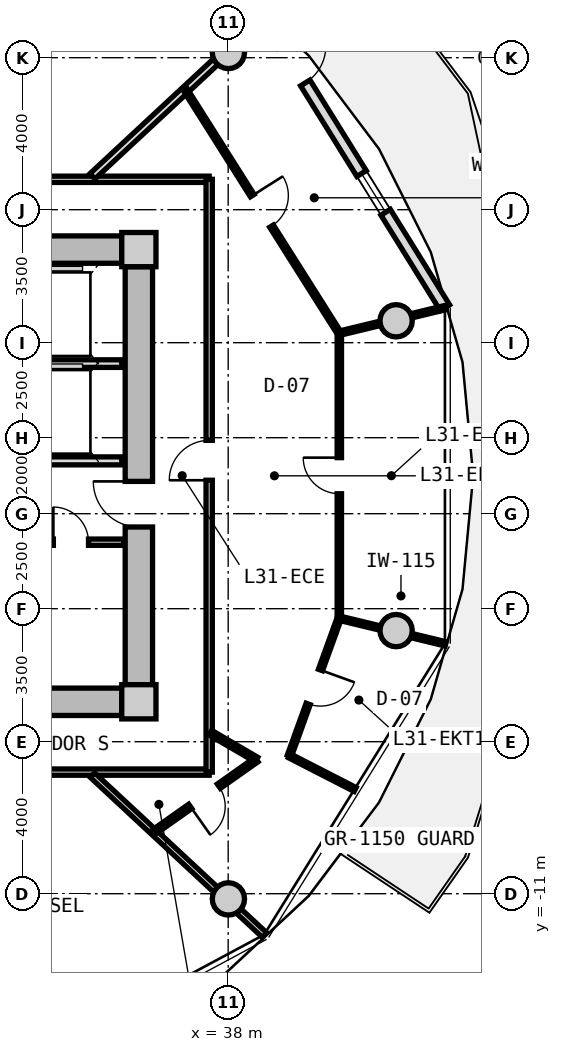
"""IFC4 building model, lengths in metres.
Left out: names, types, materials, properties, quantities, classifications, styles, units other than length and angle.
Written with IfcOpenShell. Run it as: python <this file> out.ifc"""

import sys

from ifc_helpers import new_model, si_unit, direction, frame, frame_2d, origin, origin_2d, place, context, subcontext, project, spatial, rectangle, circle, extrude, source, transform, mapped, element, fill, save


model = new_model("IFC4")
c1 = context("Model", 3, precision=1e-05, world=origin(), true_north=direction((0.0, 1.0)))
c2 = subcontext(c1, "Body", "Model", "MODEL_VIEW")
j1 = project(units=[si_unit("LENGTHUNIT", "METRE"), si_unit("PLANEANGLEUNIT", "RADIAN")], contexts=[c1])
p1 = place(None, origin())
s1 = spatial("IfcSite", under=j1, at=p1, CompositionType="ELEMENT")
p2 = place(p1, origin())
s2 = spatial("IfcBuilding", under=s1, at=p2, CompositionType="ELEMENT")
p3 = place(p2, frame((0.0, 0.0, 102.35)))
s3 = spatial("IfcBuildingStorey", under=s2, at=p3, CompositionType="ELEMENT", Elevation=102.35)
m1 = source(origin(), c2, "Body", "SweptSolid", [
    extrude(rectangle(XDim=0.9, YDim=0.9, at=origin_2d()), origin(), (0.0, 0.0, 1.0), 3.05),
])
for number, where, z_axis, x_axis in (
    (1, (35.65, -5.95, 0.0), (0.0, 0.0, 1.0), (1.0, 0.0, 0.0)),
    (2, (35.65, 5.95, 0.0), (0.0, 0.0, 1.0), (1.0, 0.0, 0.0)),
):
    element("IfcColumn", number, at=place(p3, frame(where, z_axis=z_axis, x_axis=x_axis)), inside=s3, PredefinedType="COLUMN", context=c2, shape_type="MappedRepresentation", body=[
        mapped(m1, transform((0.0, 0.0, 0.0), x_axis=(1.0, 0.0, 0.0), y_axis=(0.0, 1.0, 0.0), z_axis=(0.0, 0.0, 1.0), scale=1.0)),
    ])
m2 = source(origin(), c2, "Body", "SweptSolid", [
    extrude(rectangle(XDim=14.4, YDim=0.72, at=frame_2d((7.2, 0.0))), origin(), (0.0, 0.0, 1.0), 2.79),
])
for number, where, z_axis, x_axis in (
    (3, (20.8, 5.95, 0.0), (0.0, 0.0, 1.0), (1.0, 0.0, 0.0)),
    (4, (35.2, -5.95, 0.0), (0.0, 0.0, 1.0), (-1.0, 0.0, 0.0)),
):
    element("IfcWall", number, at=place(p3, frame(where, z_axis=z_axis, x_axis=x_axis)), inside=s3, PredefinedType="SHEAR", context=c2, shape_type="MappedRepresentation", body=[
        mapped(m2, transform((0.0, 0.0, 0.0), x_axis=(1.0, 0.0, 0.0), y_axis=(0.0, 1.0, 0.0), z_axis=(0.0, 0.0, 1.0), scale=1.0)),
    ])
m3 = source(origin(), c2, "Body", "SweptSolid", [
    extrude(rectangle(XDim=11.0, YDim=0.72, at=frame_2d((5.5, 0.0))), origin(), (0.0, 0.0, 1.0), 2.79),
])
p4 = place(p3, frame((35.65, 5.5, 0.0), z_axis=(0.0, 0.0, 1.0), x_axis=(0.0, -1.0, 0.0)))
e5 = element("IfcWall", 5, at=p4, inside=s3, PredefinedType="SHEAR", context=c2, shape_type="MappedRepresentation", body=[
    mapped(m3, transform((0.0, 0.0, 0.0), x_axis=(1.0, 0.0, 0.0), y_axis=(0.0, 1.0, 0.0), z_axis=(0.0, 0.0, 1.0), scale=1.0)),
])
p5 = place(p4, frame((5.65, 0.0, 0.0)))
e6 = element("IfcOpeningElement", 6, at=p5, cuts=e5, PredefinedType="OPENING", context=c2, shape_type="SweptSolid", body=[
    extrude(rectangle(XDim=1.2, YDim=2.15, at=frame_2d((0.6, 1.075))), frame((0.0, 0.37, 0.0), z_axis=(0.0, -1.0, 0.0), x_axis=(1.0, 0.0, 0.0)), (0.0, 0.0, 1.0), 0.74),
])
m4 = source(origin(), c2, "Body", "SweptSolid", [
    extrude(circle(Radius=0.425, at=origin_2d()), origin(), (0.0, 0.0, 1.0), 3.05),
])
for number, where, z_axis, x_axis in (
    (7, (42.419, 4.076, 0.0), (0.0, 0.0, 1.0), (1.0, 0.0, 0.0)),
    (8, (38.006, 11.137, 0.0), (0.0, 0.0, 1.0), (1.0, 0.0, 0.0)),
    (9, (38.006, -11.137, 0.0), (0.0, 0.0, 1.0), (1.0, 0.0, 0.0)),
    (10, (42.419, -4.076, 0.0), (0.0, 0.0, 1.0), (1.0, 0.0, 0.0)),
):
    element("IfcColumn", number, at=place(p3, frame(where, z_axis=z_axis, x_axis=x_axis)), inside=s3, PredefinedType="COLUMN", context=c2, shape_type="MappedRepresentation", body=[
        mapped(m4, transform((0.0, 0.0, 0.0), x_axis=(1.0, 0.0, 0.0), y_axis=(0.0, 1.0, 0.0), z_axis=(0.0, 0.0, 1.0), scale=1.0)),
    ])
m5 = source(origin(), c2, "Body", "SweptSolid", [
    extrude(rectangle(XDim=9.014, YDim=0.29, at=frame_2d((4.507, 0.0))), origin(), (0.0, 0.0, 1.0), 2.79),
])
p6 = place(p3, frame((38.947, 12.077, 0.0), z_axis=(0.0, 0.0, 1.0), x_axis=(0.527732945084, -0.849410347637, 0.0)))
e11 = element("IfcWall", 11, at=p6, inside=s3, PredefinedType="SOLIDWALL", context=c2, shape_type="MappedRepresentation", body=[
    mapped(m5, transform((0.0, 0.0, 0.0), x_axis=(1.0, 0.0, 0.0), y_axis=(0.0, 1.0, 0.0), z_axis=(0.0, 0.0, 1.0), scale=1.0)),
])
p7 = place(p6, frame((0.9, 0.0, 0.0)))
e12 = element("IfcOpeningElement", 12, at=p7, cuts=e11, PredefinedType="OPENING", context=c2, shape_type="SweptSolid", body=[
    extrude(rectangle(XDim=1.15, YDim=2.25, at=frame_2d((0.575, 1.125))), frame((0.0, 0.155, 0.0), z_axis=(0.0, -1.0, 0.0), x_axis=(1.0, 0.0, 0.0)), (0.0, 0.0, 1.0), 0.31),
])
p8 = place(p6, frame((4.857, 0.0, 0.85)))
e13 = element("IfcOpeningElement", 13, at=p8, cuts=e11, PredefinedType="OPENING", context=c2, shape_type="SweptSolid", body=[
    extrude(rectangle(XDim=1.2, YDim=1.5, at=frame_2d((0.6, 0.75))), frame((0.0, 0.155, 0.0), z_axis=(0.0, -1.0, 0.0), x_axis=(1.0, 0.0, 0.0)), (0.0, 0.0, 1.0), 0.31),
])
m6 = source(origin(), c2, "Body", "SweptSolid", [
    extrude(rectangle(XDim=3.2, YDim=0.2, at=frame_2d((1.6, 0.0))), origin(), (0.0, 0.0, 1.0), 2.775),
])
p9 = place(p3, frame((32.0, 2.95, 0.0), z_axis=(0.0, 0.0, 1.0), x_axis=(1.0, 0.0, 0.0)))
e14 = element("IfcWall", 14, at=p9, inside=s3, PredefinedType="PARTITIONING", context=c2, shape_type="MappedRepresentation", body=[
    mapped(m6, transform((0.0, 0.0, 0.0), x_axis=(1.0, 0.0, 0.0), y_axis=(0.0, 1.0, 0.0), z_axis=(0.0, 0.0, 1.0), scale=1.0)),
])
m7 = source(origin(), c2, "Body", "SweptSolid", [
    extrude(rectangle(XDim=6.66, YDim=0.21, at=frame_2d((3.33, 0.0))), origin(), (0.0, 0.0, 1.0), 2.775),
])
p10 = place(p3, frame((28.54, 0.39, 0.0), z_axis=(0.0, 0.0, 1.0), x_axis=(1.0, 0.0, 0.0)))
e15 = element("IfcWall", 15, at=p10, inside=s3, PredefinedType="PARTITIONING", context=c2, shape_type="MappedRepresentation", body=[
    mapped(m7, transform((0.0, 0.0, 0.0), x_axis=(1.0, 0.0, 0.0), y_axis=(0.0, 1.0, 0.0), z_axis=(0.0, 0.0, 1.0), scale=1.0)),
])
p11 = place(p10, frame((1.0, 0.0, 0.0)))
e16 = element("IfcOpeningElement", 16, at=p11, cuts=e15, PredefinedType="OPENING", context=c2, shape_type="SweptSolid", body=[
    extrude(rectangle(XDim=1.2, YDim=2.15, at=frame_2d((0.6, 1.075))), frame((0.0, 0.115, 0.0), z_axis=(0.0, -1.0, 0.0), x_axis=(1.0, 0.0, 0.0)), (0.0, 0.0, 1.0), 0.23),
])
m8 = source(origin(), c2, "Body", "SweptSolid", [
    extrude(rectangle(XDim=2.7, YDim=0.165, at=frame_2d((1.35, 0.0))), origin(), (0.0, 0.0, 1.0), 2.775),
])
p12 = place(p3, frame((32.55, -1.75, 0.0), z_axis=(0.0, 0.0, 1.0), x_axis=(1.0, 0.0, 0.0)))
e17 = element("IfcWall", 17, at=p12, inside=s3, PredefinedType="PARTITIONING", context=c2, shape_type="MappedRepresentation", body=[
    mapped(m8, transform((0.0, 0.0, 0.0), x_axis=(1.0, 0.0, 0.0), y_axis=(0.0, 1.0, 0.0), z_axis=(0.0, 0.0, 1.0), scale=1.0)),
])
p13 = place(p12, frame((0.85, 0.0, 0.0)))
e18 = element("IfcOpeningElement", 18, at=p13, cuts=e17, PredefinedType="OPENING", context=c2, shape_type="SweptSolid", body=[
    extrude(rectangle(XDim=0.925, YDim=2.1, at=frame_2d((0.462, 1.05))), frame((0.0, 0.093, 0.0), z_axis=(0.0, -1.0, 0.0), x_axis=(1.0, 0.0, 0.0)), (0.0, 0.0, 1.0), 0.185),
])
m9 = source(origin(), c2, "Body", "SweptSolid", [
    extrude(rectangle(XDim=9.234, YDim=0.165, at=frame_2d((4.617, 0.0))), origin(), (0.0, 0.0, 1.0), 2.775),
])
p14 = place(p3, frame((28.266, 7.8, 0.0), z_axis=(0.0, 0.0, 1.0), x_axis=(1.0, 0.0, 0.0)))
e19 = element("IfcWall", 19, at=p14, inside=s3, PredefinedType="PARTITIONING", context=c2, shape_type="MappedRepresentation", body=[
    mapped(m9, transform((0.0, 0.0, 0.0), x_axis=(1.0, 0.0, 0.0), y_axis=(0.0, 1.0, 0.0), z_axis=(0.0, 0.0, 1.0), scale=1.0)),
])
p15 = place(p14, frame((2.588, 0.0, 0.0)))
e20 = element("IfcOpeningElement", 20, at=p15, cuts=e19, PredefinedType="OPENING", context=c2, shape_type="SweptSolid", body=[
    extrude(rectangle(XDim=1.25, YDim=2.2, at=frame_2d((0.625, 1.1))), frame((0.0, 0.093, 0.0), z_axis=(0.0, -1.0, 0.0), x_axis=(1.0, 0.0, 0.0)), (0.0, 0.0, 1.0), 0.185),
])
m10 = source(origin(), c2, "Body", "SweptSolid", [
    extrude(rectangle(XDim=8.6, YDim=0.165, at=frame_2d((4.3, 0.0))), origin(), (0.0, 0.0, 1.0), 2.775),
])
p16 = place(p3, frame((37.5, -7.8, 0.0), z_axis=(0.0, 0.0, 1.0), x_axis=(-1.0, 0.0, 0.0)))
e21 = element("IfcWall", 21, at=p16, inside=s3, PredefinedType="PARTITIONING", context=c2, shape_type="MappedRepresentation", body=[
    mapped(m10, transform((0.0, 0.0, 0.0), x_axis=(1.0, 0.0, 0.0), y_axis=(0.0, 1.0, 0.0), z_axis=(0.0, 0.0, 1.0), scale=1.0)),
])
m11 = source(origin(), c2, "Body", "SweptSolid", [
    extrude(rectangle(XDim=15.6, YDim=0.165, at=frame_2d((7.8, 0.0))), origin(), (0.0, 0.0, 1.0), 2.775),
])
p17 = place(p3, frame((37.5, 7.8, 0.0), z_axis=(0.0, 0.0, 1.0), x_axis=(0.0, -1.0, 0.0)))
e22 = element("IfcWall", 22, at=p17, inside=s3, PredefinedType="PARTITIONING", context=c2, shape_type="MappedRepresentation", body=[
    mapped(m11, transform((0.0, 0.0, 0.0), x_axis=(1.0, 0.0, 0.0), y_axis=(0.0, 1.0, 0.0), z_axis=(0.0, 0.0, 1.0), scale=1.0)),
])
p18 = place(p17, frame((6.87, 0.0, 0.0)))
e23 = element("IfcOpeningElement", 23, at=p18, cuts=e22, PredefinedType="OPENING", context=c2, shape_type="SweptSolid", body=[
    extrude(rectangle(XDim=1.05, YDim=2.15, at=frame_2d((0.525, 1.075))), frame((0.0, 0.093, 0.0), z_axis=(0.0, -1.0, 0.0), x_axis=(1.0, 0.0, 0.0)), (0.0, 0.0, 1.0), 0.185),
])
m12 = source(origin(), c2, "Body", "SweptSolid", [
    extrude(rectangle(XDim=6.187, YDim=0.165, at=frame_2d((3.093, 0.0))), origin(), (0.0, 0.0, 1.0), 2.275),
])
p19 = place(p3, frame((34.429, -7.88, 0.0), z_axis=(0.0, 0.0, 1.0), x_axis=(0.732501077882, -0.680765870841, 0.0)))
e24 = element("IfcWall", 24, at=p19, inside=s3, PredefinedType="PARTITIONING", context=c2, shape_type="MappedRepresentation", body=[
    mapped(m12, transform((0.0, 0.0, 0.0), x_axis=(1.0, 0.0, 0.0), y_axis=(0.0, 1.0, 0.0), z_axis=(0.0, 0.0, 1.0), scale=1.0)),
])
m13 = source(origin(), c2, "Body", "SweptSolid", [
    extrude(rectangle(XDim=6.187, YDim=0.19, at=frame_2d((3.093, 0.0))), origin(), (0.0, 0.0, 1.0), 2.275),
])
p20 = place(p3, frame((34.429, 7.88, 0.0), z_axis=(0.0, 0.0, 1.0), x_axis=(0.732501077882, 0.680765870841, 0.0)))
e25 = element("IfcWall", 25, at=p20, inside=s3, PredefinedType="PARTITIONING", context=c2, shape_type="MappedRepresentation", body=[
    mapped(m13, transform((0.0, 0.0, 0.0), x_axis=(1.0, 0.0, 0.0), y_axis=(0.0, 1.0, 0.0), z_axis=(0.0, 0.0, 1.0), scale=1.0)),
])
m14 = source(origin(), c2, "Body", "SweptSolid", [
    extrude(rectangle(XDim=7.499, YDim=0.115, at=frame_2d((3.75, 0.0))), origin(), (0.0, 0.0, 1.0), 2.775),
])
p21 = place(p3, frame((40.925, -3.75, 0.0), z_axis=(0.0, 0.0, 1.0), x_axis=(0.0, 1.0, 0.0)))
e26 = element("IfcWall", 26, at=p21, inside=s3, PredefinedType="PARTITIONING", context=c2, shape_type="MappedRepresentation", body=[
    mapped(m14, transform((0.0, 0.0, 0.0), x_axis=(1.0, 0.0, 0.0), y_axis=(0.0, 1.0, 0.0), z_axis=(0.0, 0.0, 1.0), scale=1.0)),
])
p22 = place(p21, frame((3.275, 0.0, 0.0)))
e27 = element("IfcOpeningElement", 27, at=p22, cuts=e26, PredefinedType="OPENING", context=c2, shape_type="SweptSolid", body=[
    extrude(rectangle(XDim=0.95, YDim=2.1, at=frame_2d((0.475, 1.05))), frame((0.0, 0.067, 0.0), z_axis=(0.0, -1.0, 0.0), x_axis=(1.0, 0.0, 0.0)), (0.0, 0.0, 1.0), 0.135),
])
m15 = source(origin(), c2, "Body", "SweptSolid", [
    extrude(rectangle(XDim=2.879, YDim=0.115, at=frame_2d((1.439, 0.0))), origin(), (0.0, 0.0, 1.0), 2.275),
])
p23 = place(p3, frame((40.925, -3.75, 0.0), z_axis=(0.0, 0.0, 1.0), x_axis=(0.972018140943, -0.234905797454, 0.0)))
e28 = element("IfcWall", 28, at=p23, inside=s3, PredefinedType="PARTITIONING", context=c2, shape_type="MappedRepresentation", body=[
    mapped(m15, transform((0.0, 0.0, 0.0), x_axis=(1.0, 0.0, 0.0), y_axis=(0.0, 1.0, 0.0), z_axis=(0.0, 0.0, 1.0), scale=1.0)),
])
m16 = source(origin(), c2, "Body", "SweptSolid", [
    extrude(rectangle(XDim=7.618, YDim=0.115, at=frame_2d((3.809, 0.0))), origin(), (0.0, 0.0, 1.0), 2.775),
])
p24 = place(p3, frame((40.923, 3.749, 0.0), z_axis=(0.0, 0.0, 1.0), x_axis=(-0.534316104929, 0.845284744931, 0.0)))
e29 = element("IfcWall", 29, at=p24, inside=s3, PredefinedType="PARTITIONING", context=c2, shape_type="MappedRepresentation", body=[
    mapped(m16, transform((0.0, 0.0, 0.0), x_axis=(1.0, 0.0, 0.0), y_axis=(0.0, 1.0, 0.0), z_axis=(0.0, 0.0, 1.0), scale=1.0)),
])
p25 = place(p24, frame((3.334, 0.0, 0.0)))
e30 = element("IfcOpeningElement", 30, at=p25, cuts=e29, PredefinedType="OPENING", context=c2, shape_type="SweptSolid", body=[
    extrude(rectangle(XDim=0.95, YDim=2.1, at=frame_2d((0.475, 1.05))), frame((0.0, 0.067, 0.0), z_axis=(0.0, -1.0, 0.0), x_axis=(1.0, 0.0, 0.0)), (0.0, 0.0, 1.0), 0.135),
])
m17 = source(origin(), c2, "Body", "SweptSolid", [
    extrude(rectangle(XDim=2.881, YDim=0.115, at=frame_2d((1.44, 0.0))), origin(), (0.0, 0.0, 1.0), 2.275),
])
p26 = place(p3, frame((40.923, 3.749, 0.0), z_axis=(0.0, 0.0, 1.0), x_axis=(0.972031524605, 0.234850410208, 0.0)))
e31 = element("IfcWall", 31, at=p26, inside=s3, PredefinedType="PARTITIONING", context=c2, shape_type="MappedRepresentation", body=[
    mapped(m17, transform((0.0, 0.0, 0.0), x_axis=(1.0, 0.0, 0.0), y_axis=(0.0, 1.0, 0.0), z_axis=(0.0, 0.0, 1.0), scale=1.0)),
])
m18 = source(origin(), c2, "Body", "SweptSolid", [
    extrude(rectangle(XDim=1.407, YDim=0.14, at=frame_2d((0.704, 0.0))), origin(), (0.0, 0.0, 1.0), 2.775),
])
p27 = place(p3, frame((37.53, -6.762, 0.0), z_axis=(0.0, 0.0, 1.0), x_axis=(0.863539718977, -0.504280828258, 0.0)))
e32 = element("IfcWall", 32, at=p27, inside=s3, PredefinedType="PARTITIONING", context=c2, shape_type="MappedRepresentation", body=[
    mapped(m18, transform((0.0, 0.0, 0.0), x_axis=(1.0, 0.0, 0.0), y_axis=(0.0, 1.0, 0.0), z_axis=(0.0, 0.0, 1.0), scale=1.0)),
])
m19 = source(origin(), c2, "Body", "SweptSolid", [
    extrude(rectangle(XDim=3.347, YDim=0.14, at=frame_2d((1.673, 0.0))), origin(), (0.0, 0.0, 1.0), 2.775),
])
p28 = place(p3, frame((38.745, -7.472, 0.0), z_axis=(0.0, 0.0, 1.0), x_axis=(-0.81705680263, -0.576557179537, 0.0)))
e33 = element("IfcWall", 33, at=p28, inside=s3, PredefinedType="PARTITIONING", context=c2, shape_type="MappedRepresentation", body=[
    mapped(m19, transform((0.0, 0.0, 0.0), x_axis=(1.0, 0.0, 0.0), y_axis=(0.0, 1.0, 0.0), z_axis=(0.0, 0.0, 1.0), scale=1.0)),
])
p29 = place(p28, frame((1.214, 0.0, 0.0)))
e34 = element("IfcOpeningElement", 34, at=p29, cuts=e33, PredefinedType="OPENING", context=c2, shape_type="SweptSolid", body=[
    extrude(rectangle(XDim=0.92, YDim=2.1, at=frame_2d((0.46, 1.05))), frame((0.0, 0.08, 0.0), z_axis=(0.0, -1.0, 0.0), x_axis=(1.0, 0.0, 0.0)), (0.0, 0.0, 1.0), 0.16),
])
m20 = source(origin(), c2, "Body", "SweptSolid", [
    extrude(rectangle(XDim=1.945, YDim=0.115, at=frame_2d((0.973, 0.0))), origin(), (0.0, 0.0, 1.0), 2.775),
])
p30 = place(p3, frame((39.611, -7.37, 0.0), z_axis=(0.0, 0.0, 1.0), x_axis=(0.889684148329, -0.456576517368, 0.0)))
e35 = element("IfcWall", 35, at=p30, inside=s3, PredefinedType="PARTITIONING", context=c2, shape_type="MappedRepresentation", body=[
    mapped(m20, transform((0.0, 0.0, 0.0), x_axis=(1.0, 0.0, 0.0), y_axis=(0.0, 1.0, 0.0), z_axis=(0.0, 0.0, 1.0), scale=1.0)),
])
m21 = source(origin(), c2, "Body", "SweptSolid", [
    extrude(rectangle(XDim=3.852, YDim=0.115, at=frame_2d((1.926, 0.0))), origin(), (0.0, 0.0, 1.0), 2.775),
])
p31 = place(p3, frame((39.611, -7.37, 0.0), z_axis=(0.0, 0.0, 1.0), x_axis=(0.340653649518, 0.940188859257, 0.0)))
e36 = element("IfcWall", 36, at=p31, inside=s3, PredefinedType="PARTITIONING", context=c2, shape_type="MappedRepresentation", body=[
    mapped(m21, transform((0.0, 0.0, 0.0), x_axis=(1.0, 0.0, 0.0), y_axis=(0.0, 1.0, 0.0), z_axis=(0.0, 0.0, 1.0), scale=1.0)),
])
p32 = place(p31, frame((1.451, 0.0, 0.0)))
e37 = element("IfcOpeningElement", 37, at=p32, cuts=e36, PredefinedType="OPENING", context=c2, shape_type="SweptSolid", body=[
    extrude(rectangle(XDim=0.95, YDim=2.1, at=frame_2d((0.475, 1.05))), frame((0.0, 0.067, 0.0), z_axis=(0.0, -1.0, 0.0), x_axis=(1.0, 0.0, 0.0)), (0.0, 0.0, 1.0), 0.135),
])
m22 = source(origin(), c2, "Body", "SweptSolid", [
    extrude(rectangle(XDim=1.15, YDim=2.25, at=frame_2d((0.575, 1.125))), frame((0.0, 0.025, 0.0), z_axis=(0.0, -1.0, 0.0), x_axis=(1.0, 0.0, 0.0)), (0.0, 0.0, 1.0), 0.05),
])
p33 = place(p7, origin())
e38 = element("IfcDoor", 38, at=p33, inside=s3, OperationType="SINGLE_SWING_LEFT", PredefinedType="DOOR", context=c2, shape_type="MappedRepresentation", body=[
    mapped(m22, transform((0.0, 0.0, 0.0), x_axis=(1.0, 0.0, 0.0), y_axis=(0.0, 1.0, 0.0), z_axis=(0.0, 0.0, 1.0), scale=1.0)),
])
fill(e12, e38)
m23 = source(origin(), c2, "Body", "SweptSolid", [
    extrude(rectangle(XDim=1.2, YDim=1.5, at=frame_2d((0.6, 0.75))), frame((0.0, 0.03, 0.0), z_axis=(0.0, -1.0, 0.0), x_axis=(1.0, 0.0, 0.0)), (0.0, 0.0, 1.0), 0.06),
])
p34 = place(p8, origin())
e39 = element("IfcWindow", 39, at=p34, inside=s3, PartitioningType="SINGLE_PANEL", PredefinedType="WINDOW", context=c2, shape_type="MappedRepresentation", body=[
    mapped(m23, transform((0.0, 0.0, 0.0), x_axis=(1.0, 0.0, 0.0), y_axis=(0.0, 1.0, 0.0), z_axis=(0.0, 0.0, 1.0), scale=1.0)),
])
fill(e13, e39)
m24 = source(origin(), c2, "Body", "SweptSolid", [
    extrude(rectangle(XDim=1.2, YDim=2.15, at=frame_2d((0.6, 1.075))), frame((0.0, 0.025, 0.0), z_axis=(0.0, -1.0, 0.0), x_axis=(1.0, 0.0, 0.0)), (0.0, 0.0, 1.0), 0.05),
])
p35 = place(p5, frame((1.2, 0.0, 0.0), z_axis=(0.0, 0.0, 1.0), x_axis=(-1.0, 0.0, 0.0)))
e40 = element("IfcDoor", 40, at=p35, inside=s3, OperationType="SINGLE_SWING_RIGHT", PredefinedType="DOOR", context=c2, shape_type="MappedRepresentation", body=[
    mapped(m24, transform((0.0, 0.0, 0.0), x_axis=(1.0, 0.0, 0.0), y_axis=(0.0, 1.0, 0.0), z_axis=(0.0, 0.0, 1.0), scale=1.0)),
])
fill(e6, e40)
m25 = source(origin(), c2, "Body", "SweptSolid", [
    extrude(rectangle(XDim=0.925, YDim=2.1, at=frame_2d((0.462, 1.05))), frame((0.0, 0.025, 0.0), z_axis=(0.0, -1.0, 0.0), x_axis=(1.0, 0.0, 0.0)), (0.0, 0.0, 1.0), 0.05),
])
p36 = place(p13, origin())
e41 = element("IfcDoor", 41, at=p36, inside=s3, OperationType="SINGLE_SWING_LEFT", PredefinedType="DOOR", context=c2, shape_type="MappedRepresentation", body=[
    mapped(m25, transform((0.0, 0.0, 0.0), x_axis=(1.0, 0.0, 0.0), y_axis=(0.0, 1.0, 0.0), z_axis=(0.0, 0.0, 1.0), scale=1.0)),
])
fill(e18, e41)
m26 = source(origin(), c2, "Body", "SweptSolid", [
    extrude(rectangle(XDim=1.05, YDim=2.15, at=frame_2d((0.525, 1.075))), frame((0.0, 0.025, 0.0), z_axis=(0.0, -1.0, 0.0), x_axis=(1.0, 0.0, 0.0)), (0.0, 0.0, 1.0), 0.05),
])
p37 = place(p18, frame((1.05, 0.0, 0.0), z_axis=(0.0, 0.0, 1.0), x_axis=(-1.0, 0.0, 0.0)))
e42 = element("IfcDoor", 42, at=p37, inside=s3, OperationType="SINGLE_SWING_LEFT", PredefinedType="DOOR", context=c2, shape_type="MappedRepresentation", body=[
    mapped(m26, transform((0.0, 0.0, 0.0), x_axis=(1.0, 0.0, 0.0), y_axis=(0.0, 1.0, 0.0), z_axis=(0.0, 0.0, 1.0), scale=1.0)),
])
fill(e23, e42)
m27 = source(origin(), c2, "Body", "SweptSolid", [
    extrude(rectangle(XDim=0.92, YDim=2.1, at=frame_2d((0.46, 1.05))), frame((0.0, 0.025, 0.0), z_axis=(0.0, -1.0, 0.0), x_axis=(1.0, 0.0, 0.0)), (0.0, 0.0, 1.0), 0.05),
])
p38 = place(p29, origin())
e43 = element("IfcDoor", 43, at=p38, inside=s3, OperationType="SINGLE_SWING_RIGHT", PredefinedType="DOOR", context=c2, shape_type="MappedRepresentation", body=[
    mapped(m27, transform((0.0, 0.0, 0.0), x_axis=(1.0, 0.0, 0.0), y_axis=(0.0, 1.0, 0.0), z_axis=(0.0, 0.0, 1.0), scale=1.0)),
])
fill(e34, e43)
m28 = source(origin(), c2, "Body", "SweptSolid", [
    extrude(rectangle(XDim=0.95, YDim=2.1, at=frame_2d((0.475, 1.05))), frame((0.0, 0.025, 0.0), z_axis=(0.0, -1.0, 0.0), x_axis=(1.0, 0.0, 0.0)), (0.0, 0.0, 1.0), 0.05),
])
p39 = place(p32, frame((0.95, 0.0, 0.0), z_axis=(0.0, 0.0, 1.0), x_axis=(-1.0, 0.0, 0.0)))
e44 = element("IfcDoor", 44, at=p39, inside=s3, OperationType="SINGLE_SWING_LEFT", PredefinedType="DOOR", context=c2, shape_type="MappedRepresentation", body=[
    mapped(m28, transform((0.0, 0.0, 0.0), x_axis=(1.0, 0.0, 0.0), y_axis=(0.0, 1.0, 0.0), z_axis=(0.0, 0.0, 1.0), scale=1.0)),
])
fill(e37, e44)
p40 = place(p22, origin())
e45 = element("IfcDoor", 45, at=p40, inside=s3, OperationType="SINGLE_SWING_RIGHT", PredefinedType="DOOR", context=c2, shape_type="MappedRepresentation", body=[
    mapped(m28, transform((0.0, 0.0, 0.0), x_axis=(1.0, 0.0, 0.0), y_axis=(0.0, 1.0, 0.0), z_axis=(0.0, 0.0, 1.0), scale=1.0)),
])
fill(e27, e45)
p41 = place(p25, frame((0.95, 0.0, 0.0), z_axis=(0.0, 0.0, 1.0), x_axis=(-1.0, 0.0, 0.0)))
e46 = element("IfcDoor", 46, at=p41, inside=s3, OperationType="SINGLE_SWING_LEFT", PredefinedType="DOOR", context=c2, shape_type="MappedRepresentation", body=[
    mapped(m28, transform((0.0, 0.0, 0.0), x_axis=(1.0, 0.0, 0.0), y_axis=(0.0, 1.0, 0.0), z_axis=(0.0, 0.0, 1.0), scale=1.0)),
])
fill(e30, e46)
save(model, sys.argv[1])
